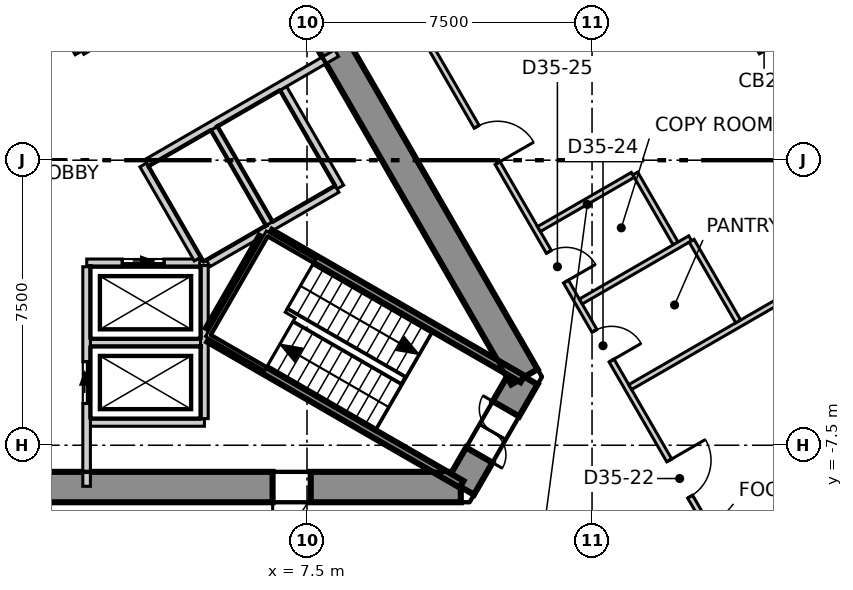
"""IFC4 building model, lengths in metres.
Left out: names, types, materials, properties, quantities, classifications, styles, units other than length and angle.
Written with IfcOpenShell. Run it as: python <this file> out.ifc"""

import sys

from ifc_helpers import new_model, si_unit, direction, frame, frame_2d, origin, place, context, subcontext, project, spatial, polyline, rectangle, outline, extrude, element, fill, save


model = new_model("IFC4")
c1 = context("Model", 3, precision=1e-05, world=origin(), true_north=direction((0.0, 1.0)))
c2 = subcontext(c1, "Body", "Model", "MODEL_VIEW")
j1 = project(units=[si_unit("LENGTHUNIT", "METRE"), si_unit("PLANEANGLEUNIT", "RADIAN")], contexts=[c1])
p1 = place(None, origin())
s1 = spatial("IfcSite", under=j1, at=p1, CompositionType="ELEMENT")
p2 = place(p1, origin())
s2 = spatial("IfcBuilding", under=s1, at=p2, CompositionType="ELEMENT")
p3 = place(p2, frame((0.0, 0.0, 152.3)))
s3 = spatial("IfcBuildingStorey", under=s2, at=p3, CompositionType="ELEMENT", Elevation=152.3)
p4 = place(p3, frame((-11.547, -8.6, -0.3), z_axis=(0.0, 0.0, 1.0), x_axis=(1.0, 0.0, 0.0)))
e1 = element("IfcWall", 1, at=p4, inside=s3, PredefinedType="SHEAR", context=c2, shape_type="SweptSolid", body=[
    extrude(outline(polyline([(-0.231, -0.4), (1.732, -0.4), (3.695, -0.4), (5.658, -0.4), (7.621, -0.4), (9.584, -0.4), (11.547, -0.4), (13.51, -0.4), (15.473, -0.4), (17.436, -0.4), (19.399, -0.4), (21.362, -0.4), (23.325, -0.4), (22.863, 0.4), (20.977, 0.4), (19.091, 0.4), (17.205, 0.4), (15.319, 0.4), (13.433, 0.4), (11.547, 0.4), (9.661, 0.4), (7.775, 0.4), (5.889, 0.4), (4.003, 0.4), (2.117, 0.4), (0.231, 0.4), (-0.231, -0.4)])), origin(), (0.0, 0.0, 1.0), 4.0),
])
p5 = place(p4, frame((4.061, 0.0, 0.3)))
e2 = element("IfcOpeningElement", 2, at=p5, cuts=e1, PredefinedType="OPENING", context=c2, shape_type="SweptSolid", body=[
    extrude(rectangle(XDim=0.9, YDim=2.1, at=frame_2d((0.45, 1.05))), frame((0.0, 0.41, 0.0), z_axis=(0.0, -1.0, 0.0), x_axis=(1.0, 0.0, 0.0)), (0.0, 0.0, 1.0), 0.82),
])
p6 = place(p4, frame((18.143, 0.0, 0.3)))
e3 = element("IfcOpeningElement", 3, at=p6, cuts=e1, PredefinedType="OPENING", context=c2, shape_type="SweptSolid", body=[
    extrude(rectangle(XDim=1.0, YDim=2.1, at=frame_2d((0.5, 1.05))), frame((0.0, 0.41, 0.0), z_axis=(0.0, -1.0, 0.0), x_axis=(1.0, 0.0, 0.0)), (0.0, 0.0, 1.0), 0.82),
])
p7 = place(p3, frame((11.547, -8.6, -0.3), z_axis=(0.0, 0.0, 1.0), x_axis=(0.49987182685, 0.866099391942, 0.0)))
e4 = element("IfcWall", 4, at=p7, inside=s3, PredefinedType="SHEAR", context=c2, shape_type="SweptSolid", body=[
    extrude(outline(polyline([(-0.231, -0.4), (1.674, -0.4), (3.579, -0.4), (3.118, 0.4), (1.674, 0.4), (0.231, 0.4), (-0.231, -0.4)])), origin(), (0.0, 0.0, 1.0), 4.0),
])
p8 = place(p7, frame((0.974, 0.0, 0.3)))
e5 = element("IfcOpeningElement", 5, at=p8, cuts=e4, PredefinedType="OPENING", context=c2, shape_type="SweptSolid", body=[
    extrude(rectangle(XDim=1.4, YDim=2.1, at=frame_2d((0.7, 1.05))), frame((0.0, 0.41, 0.0), z_axis=(0.0, -1.0, 0.0), x_axis=(1.0, 0.0, 0.0)), (0.0, 0.0, 1.0), 0.82),
])
p9 = place(p3, frame((13.221, -5.7, -0.3), z_axis=(0.0, 0.0, 1.0), x_axis=(-0.499995765644, 0.866027848477, 0.0)))
e6 = element("IfcWall", 6, at=p9, inside=s3, PredefinedType="SHEAR", context=c2, shape_type="SweptSolid", body=[
    extrude(outline(polyline([(-0.231, -0.4), (1.732, -0.4), (3.695, -0.4), (5.658, -0.4), (7.621, -0.4), (9.584, -0.4), (11.547, -0.4), (13.51, -0.4), (15.473, -0.4), (17.436, -0.4), (19.399, -0.4), (21.362, -0.4), (23.325, -0.4), (22.863, 0.4), (20.977, 0.4), (19.091, 0.4), (17.205, 0.4), (15.319, 0.4), (13.433, 0.4), (11.547, 0.4), (9.661, 0.4), (7.775, 0.4), (5.889, 0.4), (4.003, 0.4), (2.117, 0.4), (0.231, 0.4), (-0.231, -0.4)])), origin(), (0.0, 0.0, 1.0), 4.0),
])
p10 = place(p9, frame((10.647, 0.0, 0.3)))
e7 = element("IfcOpeningElement", 7, at=p10, cuts=e6, PredefinedType="OPENING", context=c2, shape_type="SweptSolid", body=[
    extrude(rectangle(XDim=1.8, YDim=2.1, at=frame_2d((0.9, 1.05))), frame((0.0, 0.41, 0.0), z_axis=(0.0, -1.0, 0.0), x_axis=(1.0, 0.0, 0.0)), (0.0, 0.0, 1.0), 0.82),
])
p11 = place(p3, frame((30.664, -14.22, 0.0), z_axis=(0.0, 0.0, 1.0), x_axis=(-0.499984613623, 0.866034286931, 0.0)))
e8 = element("IfcWall", 8, at=p11, inside=s3, PredefinedType="ELEMENTEDWALL", context=c2, shape_type="SweptSolid", body=[
    extrude(rectangle(XDim=55.274, YDim=0.2, at=frame_2d((27.637, 0.0))), origin(), (0.0, 0.0, 1.0), 3.7),
])
p12 = place(p11, frame((2.146, 0.0, 0.9)))
e9 = element("IfcOpeningElement", 9, at=p12, cuts=e8, PredefinedType="OPENING", context=c2, shape_type="SweptSolid", body=[
    extrude(rectangle(XDim=4.9, YDim=2.5, at=frame_2d((2.45, 1.25))), frame((0.0, 0.11, 0.0), z_axis=(0.0, -1.0, 0.0), x_axis=(1.0, 0.0, 0.0)), (0.0, 0.0, 1.0), 0.22),
])
p13 = place(p11, frame((8.732, 0.0, 0.9)))
e10 = element("IfcOpeningElement", 10, at=p13, cuts=e8, PredefinedType="OPENING", context=c2, shape_type="SweptSolid", body=[
    extrude(rectangle(XDim=4.9, YDim=2.5, at=frame_2d((2.45, 1.25))), frame((0.0, 0.11, 0.0), z_axis=(0.0, -1.0, 0.0), x_axis=(1.0, 0.0, 0.0)), (0.0, 0.0, 1.0), 0.22),
])
p14 = place(p11, frame((15.318, 0.0, 0.9)))
e11 = element("IfcOpeningElement", 11, at=p14, cuts=e8, PredefinedType="OPENING", context=c2, shape_type="SweptSolid", body=[
    extrude(rectangle(XDim=4.9, YDim=2.5, at=frame_2d((2.45, 1.25))), frame((0.0, 0.11, 0.0), z_axis=(0.0, -1.0, 0.0), x_axis=(1.0, 0.0, 0.0)), (0.0, 0.0, 1.0), 0.22),
])
p15 = place(p11, frame((21.904, 0.0, 0.9)))
e12 = element("IfcOpeningElement", 12, at=p15, cuts=e8, PredefinedType="OPENING", context=c2, shape_type="SweptSolid", body=[
    extrude(rectangle(XDim=4.9, YDim=2.5, at=frame_2d((2.45, 1.25))), frame((0.0, 0.11, 0.0), z_axis=(0.0, -1.0, 0.0), x_axis=(1.0, 0.0, 0.0)), (0.0, 0.0, 1.0), 0.22),
])
p16 = place(p11, frame((28.49, 0.0, 0.9)))
e13 = element("IfcOpeningElement", 13, at=p16, cuts=e8, PredefinedType="OPENING", context=c2, shape_type="SweptSolid", body=[
    extrude(rectangle(XDim=4.9, YDim=2.5, at=frame_2d((2.45, 1.25))), frame((0.0, 0.11, 0.0), z_axis=(0.0, -1.0, 0.0), x_axis=(1.0, 0.0, 0.0)), (0.0, 0.0, 1.0), 0.22),
])
p17 = place(p11, frame((35.076, 0.0, 0.9)))
e14 = element("IfcOpeningElement", 14, at=p17, cuts=e8, PredefinedType="OPENING", context=c2, shape_type="SweptSolid", body=[
    extrude(rectangle(XDim=4.9, YDim=2.5, at=frame_2d((2.45, 1.25))), frame((0.0, 0.11, 0.0), z_axis=(0.0, -1.0, 0.0), x_axis=(1.0, 0.0, 0.0)), (0.0, 0.0, 1.0), 0.22),
])
p18 = place(p11, frame((41.662, 0.0, 0.9)))
e15 = element("IfcOpeningElement", 15, at=p18, cuts=e8, PredefinedType="OPENING", context=c2, shape_type="SweptSolid", body=[
    extrude(rectangle(XDim=4.9, YDim=2.5, at=frame_2d((2.45, 1.25))), frame((0.0, 0.11, 0.0), z_axis=(0.0, -1.0, 0.0), x_axis=(1.0, 0.0, 0.0)), (0.0, 0.0, 1.0), 0.22),
])
p19 = place(p11, frame((48.248, 0.0, 0.9)))
e16 = element("IfcOpeningElement", 16, at=p19, cuts=e8, PredefinedType="OPENING", context=c2, shape_type="SweptSolid", body=[
    extrude(rectangle(XDim=4.9, YDim=2.5, at=frame_2d((2.45, 1.25))), frame((0.0, 0.11, 0.0), z_axis=(0.0, -1.0, 0.0), x_axis=(1.0, 0.0, 0.0)), (0.0, 0.0, 1.0), 0.22),
])
p20 = place(p3, frame((9.803, 4.62, 0.0), z_axis=(0.0, 0.0, 1.0), x_axis=(0.500017706633, -0.866015180614, 0.0)))
e17 = element("IfcWall", 17, at=p20, inside=s3, PredefinedType="PARTITIONING", context=c2, shape_type="SweptSolid", body=[
    extrude(rectangle(XDim=17.656, YDim=0.15, at=frame_2d((8.828, 0.0))), origin(), (0.0, 0.0, 1.0), 3.7),
])
p21 = place(p20, frame((14.456, 0.0, 0.0)))
e18 = element("IfcOpeningElement", 18, at=p21, cuts=e17, PredefinedType="OPENING", context=c2, shape_type="SweptSolid", body=[
    extrude(rectangle(XDim=1.1, YDim=2.1, at=frame_2d((0.55, 1.05))), frame((0.0, 0.085, 0.0), z_axis=(0.0, -1.0, 0.0), x_axis=(1.0, 0.0, 0.0)), (0.0, 0.0, 1.0), 0.17),
])
p22 = place(p20, frame((4.321, 0.0, 0.0)))
e19 = element("IfcOpeningElement", 19, at=p22, cuts=e17, PredefinedType="OPENING", context=c2, shape_type="SweptSolid", body=[
    extrude(rectangle(XDim=1.1, YDim=2.1, at=frame_2d((0.55, 1.05))), frame((0.0, 0.085, 0.0), z_axis=(0.0, -1.0, 0.0), x_axis=(1.0, 0.0, 0.0)), (0.0, 0.0, 1.0), 0.17),
])
p23 = place(p20, frame((10.521, 0.0, 0.0)))
e20 = element("IfcOpeningElement", 20, at=p23, cuts=e17, PredefinedType="OPENING", context=c2, shape_type="SweptSolid", body=[
    extrude(rectangle(XDim=0.9, YDim=2.1, at=frame_2d((0.45, 1.05))), frame((0.0, 0.085, 0.0), z_axis=(0.0, -1.0, 0.0), x_axis=(1.0, 0.0, 0.0)), (0.0, 0.0, 1.0), 0.17),
])
p24 = place(p20, frame((8.121, 0.0, 0.0)))
e21 = element("IfcOpeningElement", 21, at=p24, cuts=e17, PredefinedType="OPENING", context=c2, shape_type="SweptSolid", body=[
    extrude(rectangle(XDim=0.9, YDim=2.1, at=frame_2d((0.45, 1.05))), frame((0.0, 0.085, 0.0), z_axis=(0.0, -1.0, 0.0), x_axis=(1.0, 0.0, 0.0)), (0.0, 0.0, 1.0), 0.17),
])
p25 = place(p3, frame((16.137, -0.35, 0.0), z_axis=(0.0, 0.0, 1.0), x_axis=(0.499921421619, -0.866070766281, 0.0)))
e22 = element("IfcWall", 22, at=p25, inside=s3, PredefinedType="PARTITIONING", context=c2, shape_type="SweptSolid", body=[
    extrude(rectangle(XDim=2.124, YDim=0.15, at=frame_2d((1.062, 0.0))), origin(), (0.0, 0.0, 1.0), 3.7),
])
p26 = place(p3, frame((13.604, -1.812, 0.0), z_axis=(0.0, 0.0, 1.0), x_axis=(0.866004402611, 0.500036373335, 0.0)))
e23 = element("IfcWall", 23, at=p26, inside=s3, PredefinedType="PARTITIONING", context=c2, shape_type="SweptSolid", body=[
    extrude(rectangle(XDim=2.85, YDim=0.15, at=frame_2d((1.425, 0.0))), origin(), (0.0, 0.0, 1.0), 3.7),
])
p27 = place(p3, frame((14.704, -3.718, 0.0), z_axis=(0.0, 0.0, 1.0), x_axis=(0.865901827335, 0.500213979631, 0.0)))
e24 = element("IfcWall", 24, at=p27, inside=s3, PredefinedType="PARTITIONING", context=c2, shape_type="SweptSolid", body=[
    extrude(rectangle(XDim=3.325, YDim=0.15, at=frame_2d((1.662, 0.0))), origin(), (0.0, 0.0, 1.0), 3.7),
])
p28 = place(p3, frame((16.004, -5.969, 0.0), z_axis=(0.0, 0.0, 1.0), x_axis=(0.866045766046, 0.49996472987, 0.0)))
e25 = element("IfcWall", 25, at=p28, inside=s3, PredefinedType="PARTITIONING", context=c2, shape_type="SweptSolid", body=[
    extrude(rectangle(XDim=8.49, YDim=0.15, at=frame_2d((4.245, 0.0))), origin(), (0.0, 0.0, 1.0), 3.7),
])
p29 = place(p3, frame((17.621, -2.12, 0.0), z_axis=(0.0, 0.0, 1.0), x_axis=(0.499943856944, -0.866057815567, 0.0)))
e26 = element("IfcWall", 26, at=p29, inside=s3, PredefinedType="PARTITIONING", context=c2, shape_type="SweptSolid", body=[
    extrude(rectangle(XDim=2.45, YDim=0.15, at=frame_2d((1.225, 0.0))), origin(), (0.0, 0.0, 1.0), 3.7),
])
p30 = place(p3, frame((1.8, -6.9, 0.0), z_axis=(0.0, 0.0, 1.0), x_axis=(1.0, 0.0, 0.0)))
e27 = element("IfcWall", 27, at=p30, inside=s3, PredefinedType="SOLIDWALL", context=c2, shape_type="SweptSolid", body=[
    extrude(rectangle(XDim=3.0, YDim=0.2, at=frame_2d((1.5, 0.0))), origin(), (0.0, 0.0, 1.0), 3.7),
])
p31 = place(p3, frame((1.8, -4.8, 0.0), z_axis=(0.0, 0.0, 1.0), x_axis=(1.0, 0.0, 0.0)))
e28 = element("IfcWall", 28, at=p31, inside=s3, PredefinedType="SOLIDWALL", context=c2, shape_type="SweptSolid", body=[
    extrude(rectangle(XDim=2.9, YDim=0.2, at=frame_2d((1.45, 0.0))), origin(), (0.0, 0.0, 1.0), 3.7),
])
p32 = place(p3, frame((1.703, -2.7, 0.0), z_axis=(0.0, 0.0, 1.0), x_axis=(1.0, 0.0, 0.0)))
e29 = element("IfcWall", 29, at=p32, inside=s3, PredefinedType="SOLIDWALL", context=c2, shape_type="SweptSolid", body=[
    extrude(rectangle(XDim=2.973, YDim=0.2, at=frame_2d((1.487, 0.0))), origin(), (0.0, 0.0, 1.0), 3.7),
])
p33 = place(p32, frame((0.936, 0.0, 0.0)))
e30 = element("IfcOpeningElement", 30, at=p33, cuts=e29, PredefinedType="OPENING", context=c2, shape_type="SweptSolid", body=[
    extrude(rectangle(XDim=1.1, YDim=2.1, at=frame_2d((0.55, 1.05))), frame((0.0, 0.11, 0.0), z_axis=(0.0, -1.0, 0.0), x_axis=(1.0, 0.0, 0.0)), (0.0, 0.0, 1.0), 0.22),
])
p34 = place(p3, frame((0.0, 5.4, 0.0), z_axis=(0.0, 0.0, 1.0), x_axis=(0.500103862429, -0.865965430478, 0.0)))
e31 = element("IfcWall", 31, at=p34, inside=s3, PredefinedType="SOLIDWALL", context=c2, shape_type="SweptSolid", body=[
    extrude(rectangle(XDim=2.973, YDim=0.2, at=frame_2d((1.487, 0.0))), origin(), (0.0, 0.0, 1.0), 3.7),
])
p35 = place(p34, frame((0.937, 0.0, 0.0)))
e32 = element("IfcOpeningElement", 32, at=p35, cuts=e31, PredefinedType="OPENING", context=c2, shape_type="SweptSolid", body=[
    extrude(rectangle(XDim=1.1, YDim=2.1, at=frame_2d((0.55, 1.05))), frame((0.0, 0.11, 0.0), z_axis=(0.0, -1.0, 0.0), x_axis=(1.0, 0.0, 0.0)), (0.0, 0.0, 1.0), 0.22),
])
p36 = place(p3, frame((3.19, -0.125, 0.0), z_axis=(0.0, 0.0, 1.0), x_axis=(0.499988658015, -0.866031951983, 0.0)))
e33 = element("IfcWall", 33, at=p36, inside=s3, PredefinedType="SOLIDWALL", context=c2, shape_type="SweptSolid", body=[
    extrude(rectangle(XDim=2.858, YDim=0.2, at=frame_2d((1.429, 0.0))), origin(), (0.0, 0.0, 1.0), 3.7),
])
p37 = place(p3, frame((1.577, 2.874, 0.0), z_axis=(0.0, 0.0, 1.0), x_axis=(0.866073694534, 0.499916348638, 0.0)))
e34 = element("IfcWall", 34, at=p37, inside=s3, PredefinedType="SOLIDWALL", context=c2, shape_type="SweptSolid", body=[
    extrude(rectangle(XDim=5.777, YDim=0.2, at=frame_2d((2.888, 0.0))), origin(), (0.0, 0.0, 1.0), 3.7),
])
p38 = place(p37, frame((2.497, 0.0, 0.0)))
e35 = element("IfcOpeningElement", 35, at=p38, cuts=e34, PredefinedType="OPENING", context=c2, shape_type="SweptSolid", body=[
    extrude(rectangle(XDim=1.1, YDim=2.1, at=frame_2d((0.55, 1.05))), frame((0.0, 0.11, 0.0), z_axis=(0.0, -1.0, 0.0), x_axis=(1.0, 0.0, 0.0)), (0.0, 0.0, 1.0), 0.22),
])
p39 = place(p3, frame((1.7, -8.58, 0.0), z_axis=(0.0, 0.0, 1.0), x_axis=(0.0, 1.0, 0.0)))
e36 = element("IfcWall", 36, at=p39, inside=s3, PredefinedType="SOLIDWALL", context=c2, shape_type="SweptSolid", body=[
    extrude(rectangle(XDim=5.777, YDim=0.2, at=frame_2d((2.889, 0.0))), origin(), (0.0, 0.0, 1.0), 3.7),
])
p40 = place(p39, frame((2.18, 0.0, 0.0)))
e37 = element("IfcOpeningElement", 37, at=p40, cuts=e36, PredefinedType="OPENING", context=c2, shape_type="SweptSolid", body=[
    extrude(rectangle(XDim=1.1, YDim=2.1, at=frame_2d((0.55, 1.05))), frame((0.0, 0.11, 0.0), z_axis=(0.0, -1.0, 0.0), x_axis=(1.0, 0.0, 0.0)), (0.0, 0.0, 1.0), 0.22),
])
p41 = place(p3, frame((4.8, -6.8, 0.0), z_axis=(0.0, 0.0, 1.0), x_axis=(0.0, 1.0, 0.0)))
e38 = element("IfcWall", 38, at=p41, inside=s3, PredefinedType="SOLIDWALL", context=c2, shape_type="SweptSolid", body=[
    extrude(rectangle(XDim=4.029, YDim=0.2, at=frame_2d((2.015, 0.0))), origin(), (0.0, 0.0, 1.0), 3.7),
])
p42 = place(p3, frame((5.057, 0.841, 0.0), z_axis=(0.0, 0.0, 1.0), x_axis=(0.50012328804, -0.865954211699, 0.0)))
e39 = element("IfcWall", 39, at=p42, inside=s3, PredefinedType="SOLIDWALL", context=c2, shape_type="SweptSolid", body=[
    extrude(rectangle(XDim=2.9, YDim=0.2, at=frame_2d((1.45, 0.0))), origin(), (0.0, 0.0, 1.0), 3.7),
])
p43 = place(p3, frame((6.876, 1.891, 0.0), z_axis=(0.0, 0.0, 1.0), x_axis=(0.499990139034, -0.866031096941, 0.0)))
e40 = element("IfcWall", 40, at=p43, inside=s3, PredefinedType="SOLIDWALL", context=c2, shape_type="SweptSolid", body=[
    extrude(rectangle(XDim=3.0, YDim=0.2, at=frame_2d((1.5, 0.0))), origin(), (0.0, 0.0, 1.0), 3.7),
])
p44 = place(p3, frame((3.278, -0.071, 0.0), z_axis=(0.0, 0.0, 1.0), x_axis=(0.865929348003, 0.5001663366, 0.0)))
e41 = element("IfcWall", 41, at=p44, inside=s3, PredefinedType="SOLIDWALL", context=c2, shape_type="SweptSolid", body=[
    extrude(rectangle(XDim=5.776, YDim=0.2, at=frame_2d((2.888, 0.0))), origin(), (0.0, 0.0, 1.0), 3.7),
])
p45 = place(p3, frame((4.9, -2.714, 0.0), z_axis=(0.0, 0.0, 1.0), x_axis=(0.865992350556, 0.500057245502, 0.0)))
e42 = element("IfcWall", 42, at=p45, inside=s3, PredefinedType="SOLIDWALL", context=c2, shape_type="SweptSolid", body=[
    extrude(rectangle(XDim=3.914, YDim=0.2, at=frame_2d((1.957, 0.0))), origin(), (0.0, 0.0, 1.0), 3.7),
])
p46 = place(p3, frame((4.929, -4.693, 0.0), z_axis=(0.0, 0.0, 1.0), x_axis=(0.866005769735, -0.50003400563, 0.0)))
e43 = element("IfcWall", 43, at=p46, inside=s3, PredefinedType="SOLIDWALL", context=c2, shape_type="SweptSolid", body=[
    extrude(rectangle(XDim=7.665, YDim=0.2, at=frame_2d((3.833, 0.0))), origin(), (0.0, 0.0, 1.0), 3.7),
])
p47 = place(p3, frame((4.929, -4.462, 0.0), z_axis=(0.0, 0.0, 1.0), x_axis=(0.500200581029, 0.865909567298, 0.0)))
e44 = element("IfcWall", 44, at=p47, inside=s3, PredefinedType="SOLIDWALL", context=c2, shape_type="SweptSolid", body=[
    extrude(rectangle(XDim=2.799, YDim=0.2, at=frame_2d((1.399, 0.0))), origin(), (0.0, 0.0, 1.0), 3.7),
])
p48 = place(p3, frame((6.529, -1.922, 0.0), z_axis=(0.0, 0.0, 1.0), x_axis=(0.866060938598, -0.499938446846, 0.0)))
e45 = element("IfcWall", 45, at=p48, inside=s3, PredefinedType="SOLIDWALL", context=c2, shape_type="SweptSolid", body=[
    extrude(rectangle(XDim=7.665, YDim=0.2, at=frame_2d((3.832, 0.0))), origin(), (0.0, 0.0, 1.0), 3.7),
])
p49 = place(p33, origin())
e46 = element("IfcDoor", 46, at=p49, inside=s3, OperationType="SLIDING_TO_LEFT", PredefinedType="DOOR", context=c2, shape_type="SweptSolid", body=[
    extrude(rectangle(XDim=1.1, YDim=2.1, at=frame_2d((0.55, 1.05))), frame((0.0, 0.025, 0.0), z_axis=(0.0, -1.0, 0.0), x_axis=(1.0, 0.0, 0.0)), (0.0, 0.0, 1.0), 0.05),
])
fill(e30, e46)
p50 = place(p40, origin())
e47 = element("IfcDoor", 47, at=p50, inside=s3, OperationType="SLIDING_TO_LEFT", PredefinedType="DOOR", context=c2, shape_type="SweptSolid", body=[
    extrude(rectangle(XDim=1.1, YDim=2.1, at=frame_2d((0.55, 1.05))), frame((0.0, 0.025, 0.0), z_axis=(0.0, -1.0, 0.0), x_axis=(1.0, 0.0, 0.0)), (0.0, 0.0, 1.0), 0.05),
])
fill(e37, e47)
p51 = place(p21, origin())
e48 = element("IfcDoor", 48, at=p51, inside=s3, OperationType="SINGLE_SWING_RIGHT", PredefinedType="DOOR", context=c2, shape_type="SweptSolid", body=[
    extrude(rectangle(XDim=1.1, YDim=2.1, at=frame_2d((0.55, 1.05))), frame((0.0, 0.025, 0.0), z_axis=(0.0, -1.0, 0.0), x_axis=(1.0, 0.0, 0.0)), (0.0, 0.0, 1.0), 0.05),
])
fill(e18, e48)
p52 = place(p22, origin())
e49 = element("IfcDoor", 49, at=p52, inside=s3, OperationType="SINGLE_SWING_LEFT", PredefinedType="DOOR", context=c2, shape_type="SweptSolid", body=[
    extrude(rectangle(XDim=1.1, YDim=2.1, at=frame_2d((0.55, 1.05))), frame((0.0, 0.025, 0.0), z_axis=(0.0, -1.0, 0.0), x_axis=(1.0, 0.0, 0.0)), (0.0, 0.0, 1.0), 0.05),
])
fill(e19, e49)
p53 = place(p23, origin())
e50 = element("IfcDoor", 50, at=p53, inside=s3, OperationType="SINGLE_SWING_LEFT", PredefinedType="DOOR", context=c2, shape_type="SweptSolid", body=[
    extrude(rectangle(XDim=0.9, YDim=2.1, at=frame_2d((0.45, 1.05))), frame((0.0, 0.025, 0.0), z_axis=(0.0, -1.0, 0.0), x_axis=(1.0, 0.0, 0.0)), (0.0, 0.0, 1.0), 0.05),
])
fill(e20, e50)
p54 = place(p24, origin())
e51 = element("IfcDoor", 51, at=p54, inside=s3, OperationType="SINGLE_SWING_LEFT", PredefinedType="DOOR", context=c2, shape_type="SweptSolid", body=[
    extrude(rectangle(XDim=0.9, YDim=2.1, at=frame_2d((0.45, 1.05))), frame((0.0, 0.025, 0.0), z_axis=(0.0, -1.0, 0.0), x_axis=(1.0, 0.0, 0.0)), (0.0, 0.0, 1.0), 0.05),
])
fill(e21, e51)
p55 = place(p8, origin())
e52 = element("IfcDoor", 52, at=p55, inside=s3, OperationType="DOUBLE_DOOR_SINGLE_SWING", PredefinedType="DOOR", context=c2, shape_type="SweptSolid", body=[
    extrude(rectangle(XDim=1.4, YDim=2.1, at=frame_2d((0.7, 1.05))), frame((0.0, 0.025, 0.0), z_axis=(0.0, -1.0, 0.0), x_axis=(1.0, 0.0, 0.0)), (0.0, 0.0, 1.0), 0.05),
])
fill(e5, e52)
p56 = place(p6, origin())
e53 = element("IfcDoor", 53, at=p56, inside=s3, OperationType="SINGLE_SWING_LEFT", PredefinedType="DOOR", context=c2, shape_type="SweptSolid", body=[
    extrude(rectangle(XDim=1.0, YDim=2.1, at=frame_2d((0.5, 1.05))), frame((0.0, 0.125, 0.0), z_axis=(0.0, -1.0, 0.0), x_axis=(1.0, 0.0, 0.0)), (0.0, 0.0, 1.0), 0.05),
])
fill(e3, e53)
save(model, sys.argv[1])
